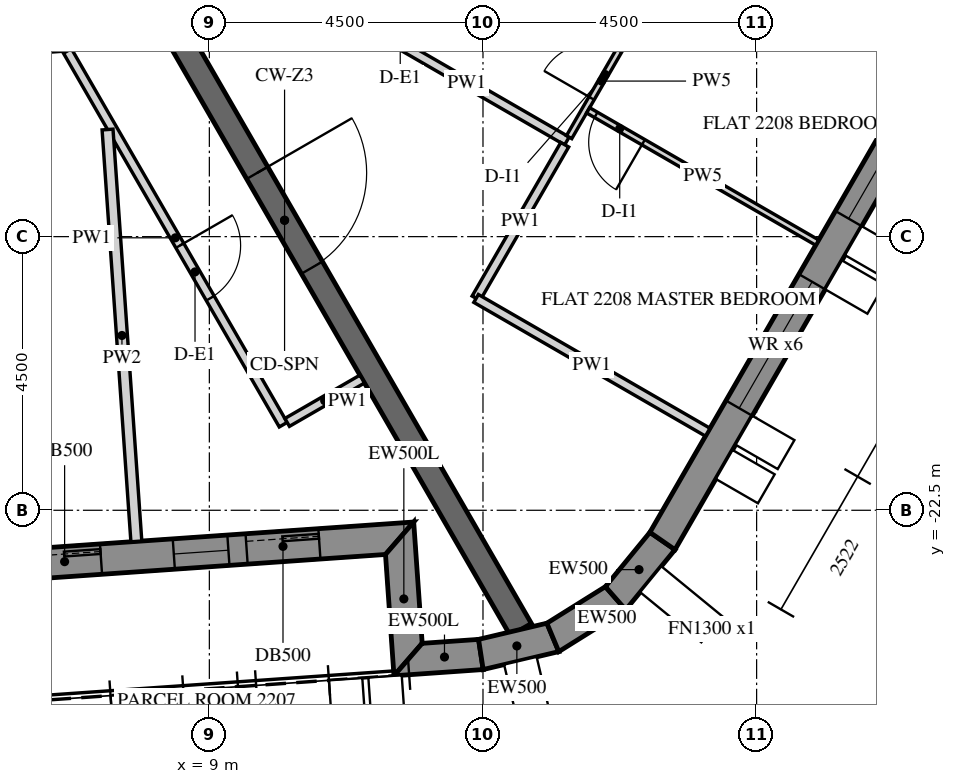
"""IFC4 building model, lengths in metres.
Left out: names, types, materials, properties, quantities, classifications, styles, units other than length and angle.
Written with IfcOpenShell. Run it as: python <this file> out.ifc"""

import sys

from ifc_helpers import new_model, si_unit, direction, frame, frame_2d, origin, place, context, subcontext, project, spatial, polyline, rectangle, outline, extrude, element, fill, save


model = new_model("IFC4")
c1 = context("Model", 3, precision=1e-05, world=origin(), true_north=direction((0.0, 1.0)))
c2 = subcontext(c1, "Body", "Model", "MODEL_VIEW")
j1 = project(units=[si_unit("LENGTHUNIT", "METRE"), si_unit("PLANEANGLEUNIT", "RADIAN")], contexts=[c1])
p1 = place(None, origin())
s1 = spatial("IfcSite", under=j1, at=p1, CompositionType="ELEMENT")
p2 = place(p1, origin())
s2 = spatial("IfcBuilding", under=s1, at=p2, CompositionType="ELEMENT")
p3 = place(p2, frame((0.0, 0.0, 279.6)))
s3 = spatial("IfcBuildingStorey", under=s2, at=p3, CompositionType="ELEMENT", Elevation=279.6)
p4 = place(p3, frame((-10.86, -24.567, -0.15), z_axis=(0.0, 0.0, 1.0), x_axis=(0.997564329317, 0.06975248292, 0.0)))
e1 = element("IfcWall", 1, at=p4, inside=s3, PredefinedType="SOLIDWALL", context=c2, shape_type="SweptSolid", body=[
    extrude(outline(polyline([(0.25, -0.25), (22.795, -0.25), (23.295, 0.25), (-0.25, 0.25), (0.25, -0.25)])), origin(), (0.0, 0.0, 1.0), 3.9),
])
p5 = place(p4, frame((1.323, 0.0, 1.05)))
e2 = element("IfcOpeningElement", 2, at=p5, cuts=e1, PredefinedType="OPENING", context=c2, shape_type="SweptSolid", body=[
    extrude(rectangle(XDim=0.9, YDim=1.5, at=frame_2d((0.45, 0.75))), frame((0.0, 0.26, 0.0), z_axis=(0.0, -1.0, 0.0), x_axis=(1.0, 0.0, 0.0)), (0.0, 0.0, 1.0), 0.52),
])
p6 = place(p4, frame((2.522, 0.0, 0.15)))
e3 = element("IfcOpeningElement", 3, at=p6, cuts=e1, PredefinedType="OPENING", context=c2, shape_type="SweptSolid", body=[
    extrude(rectangle(XDim=1.2, YDim=2.4, at=frame_2d((0.6, 1.2))), frame((0.0, 0.26, 0.0), z_axis=(0.0, -1.0, 0.0), x_axis=(1.0, 0.0, 0.0)), (0.0, 0.0, 1.0), 0.52),
])
p7 = place(p4, frame((4.922, 0.0, 1.05)))
e4 = element("IfcOpeningElement", 4, at=p7, cuts=e1, PredefinedType="OPENING", context=c2, shape_type="SweptSolid", body=[
    extrude(rectangle(XDim=0.9, YDim=1.5, at=frame_2d((0.45, 0.75))), frame((0.0, 0.26, 0.0), z_axis=(0.0, -1.0, 0.0), x_axis=(1.0, 0.0, 0.0)), (0.0, 0.0, 1.0), 0.52),
])
p8 = place(p4, frame((6.122, 0.0, 0.15)))
e5 = element("IfcOpeningElement", 5, at=p8, cuts=e1, PredefinedType="OPENING", context=c2, shape_type="SweptSolid", body=[
    extrude(rectangle(XDim=1.2, YDim=2.4, at=frame_2d((0.6, 1.2))), frame((0.0, 0.26, 0.0), z_axis=(0.0, -1.0, 0.0), x_axis=(1.0, 0.0, 0.0)), (0.0, 0.0, 1.0), 0.52),
])
p9 = place(p4, frame((8.522, 0.0, 1.05)))
e6 = element("IfcOpeningElement", 6, at=p9, cuts=e1, PredefinedType="OPENING", context=c2, shape_type="SweptSolid", body=[
    extrude(rectangle(XDim=0.9, YDim=1.5, at=frame_2d((0.45, 0.75))), frame((0.0, 0.26, 0.0), z_axis=(0.0, -1.0, 0.0), x_axis=(1.0, 0.0, 0.0)), (0.0, 0.0, 1.0), 0.52),
])
p10 = place(p4, frame((9.722, 0.0, 0.15)))
e7 = element("IfcOpeningElement", 7, at=p10, cuts=e1, PredefinedType="OPENING", context=c2, shape_type="SweptSolid", body=[
    extrude(rectangle(XDim=1.2, YDim=2.4, at=frame_2d((0.6, 1.2))), frame((0.0, 0.26, 0.0), z_axis=(0.0, -1.0, 0.0), x_axis=(1.0, 0.0, 0.0)), (0.0, 0.0, 1.0), 0.52),
])
p11 = place(p4, frame((12.122, 0.0, 1.05)))
e8 = element("IfcOpeningElement", 8, at=p11, cuts=e1, PredefinedType="OPENING", context=c2, shape_type="SweptSolid", body=[
    extrude(rectangle(XDim=0.9, YDim=1.5, at=frame_2d((0.45, 0.75))), frame((0.0, 0.26, 0.0), z_axis=(0.0, -1.0, 0.0), x_axis=(1.0, 0.0, 0.0)), (0.0, 0.0, 1.0), 0.52),
])
p12 = place(p4, frame((13.323, 0.0, 0.15)))
e9 = element("IfcOpeningElement", 9, at=p12, cuts=e1, PredefinedType="OPENING", context=c2, shape_type="SweptSolid", body=[
    extrude(rectangle(XDim=1.2, YDim=2.4, at=frame_2d((0.6, 1.2))), frame((0.0, 0.26, 0.0), z_axis=(0.0, -1.0, 0.0), x_axis=(1.0, 0.0, 0.0)), (0.0, 0.0, 1.0), 0.52),
])
p13 = place(p4, frame((15.722, 0.0, 1.05)))
e10 = element("IfcOpeningElement", 10, at=p13, cuts=e1, PredefinedType="OPENING", context=c2, shape_type="SweptSolid", body=[
    extrude(rectangle(XDim=0.9, YDim=1.5, at=frame_2d((0.45, 0.75))), frame((0.0, 0.26, 0.0), z_axis=(0.0, -1.0, 0.0), x_axis=(1.0, 0.0, 0.0)), (0.0, 0.0, 1.0), 0.52),
])
p14 = place(p4, frame((16.922, 0.0, 0.15)))
e11 = element("IfcOpeningElement", 11, at=p14, cuts=e1, PredefinedType="OPENING", context=c2, shape_type="SweptSolid", body=[
    extrude(rectangle(XDim=1.2, YDim=2.4, at=frame_2d((0.6, 1.2))), frame((0.0, 0.26, 0.0), z_axis=(0.0, -1.0, 0.0), x_axis=(1.0, 0.0, 0.0)), (0.0, 0.0, 1.0), 0.52),
])
p15 = place(p4, frame((19.323, 0.0, 1.05)))
e12 = element("IfcOpeningElement", 12, at=p15, cuts=e1, PredefinedType="OPENING", context=c2, shape_type="SweptSolid", body=[
    extrude(rectangle(XDim=0.9, YDim=1.5, at=frame_2d((0.45, 0.75))), frame((0.0, 0.26, 0.0), z_axis=(0.0, -1.0, 0.0), x_axis=(1.0, 0.0, 0.0)), (0.0, 0.0, 1.0), 0.52),
])
p16 = place(p4, frame((20.522, 0.0, 0.15)))
e13 = element("IfcOpeningElement", 13, at=p16, cuts=e1, PredefinedType="OPENING", context=c2, shape_type="SweptSolid", body=[
    extrude(rectangle(XDim=1.2, YDim=2.4, at=frame_2d((0.6, 1.2))), frame((0.0, 0.26, 0.0), z_axis=(0.0, -1.0, 0.0), x_axis=(1.0, 0.0, 0.0)), (0.0, 0.0, 1.0), 0.52),
])
p17 = place(p3, frame((12.129, -22.96, -0.15), z_axis=(0.0, 0.0, 1.0), x_axis=(0.069824268692, -0.99755930726, 0.0)))
e14 = element("IfcWall", 14, at=p17, inside=s3, PredefinedType="SOLIDWALL", context=c2, shape_type="SweptSolid", body=[
    extrude(outline(polyline([(0.25, -0.25), (2.25, -0.25), (1.75, 0.25), (-0.25, 0.25), (0.25, -0.25)])), origin(), (0.0, 0.0, 1.0), 3.9),
])
p18 = place(p3, frame((12.268, -24.955, -0.15), z_axis=(0.0, 0.0, 1.0), x_axis=(0.997561942506, 0.06978660948, 0.0)))
e15 = element("IfcWall", 15, at=p18, inside=s3, PredefinedType="SOLIDWALL", context=c2, shape_type="SweptSolid", body=[
    extrude(outline(polyline([(-0.25, -0.25), (1.22, -0.25), (1.179, 0.25), (0.25, 0.25), (-0.25, -0.25)])), origin(), (0.0, 0.0, 1.0), 3.9),
])
p19 = place(p3, frame((13.465, -24.871, -0.15), z_axis=(0.0, 0.0, 1.0), x_axis=(0.973044740285, 0.230616420501, 0.0)))
e16 = element("IfcWall", 16, at=p19, inside=s3, PredefinedType="SOLIDWALL", context=c2, shape_type="SweptSolid", body=[
    extrude(outline(polyline([(-0.021, -0.25), (1.257, -0.25), (1.175, 0.25), (0.021, 0.25), (-0.021, -0.25)])), origin(), (0.0, 0.0, 1.0), 3.9),
])
p20 = place(p3, frame((14.649, -24.591, -0.15), z_axis=(0.0, 0.0, 1.0), x_axis=(0.848054682072, 0.529908724419, 0.0)))
e17 = element("IfcWall", 17, at=p20, inside=s3, PredefinedType="SOLIDWALL", context=c2, shape_type="SweptSolid", body=[
    extrude(outline(polyline([(-0.041, -0.25), (1.257, -0.25), (1.175, 0.25), (0.041, 0.25), (-0.041, -0.25)])), origin(), (0.0, 0.0, 1.0), 3.9),
])
p21 = place(p3, frame((15.68, -23.946, -0.15), z_axis=(0.0, 0.0, 1.0), x_axis=(0.633805934167, 0.773492105852, 0.0)))
e18 = element("IfcWall", 18, at=p21, inside=s3, PredefinedType="SOLIDWALL", context=c2, shape_type="SweptSolid", body=[
    extrude(outline(polyline([(-0.041, -0.25), (1.237, -0.25), (1.196, 0.25), (0.041, 0.25), (-0.041, -0.25)])), origin(), (0.0, 0.0, 1.0), 3.9),
])
p22 = place(p3, frame((16.451, -23.005, -0.15), z_axis=(0.0, 0.0, 1.0), x_axis=(0.500003737743, 0.866023245787, 0.0)))
e19 = element("IfcWall", 19, at=p22, inside=s3, PredefinedType="SOLIDWALL", context=c2, shape_type="SweptSolid", body=[
    extrude(outline(polyline([(-0.021, -0.25), (25.468, -0.25), (25.421, 0.25), (0.021, 0.25), (-0.021, -0.25)])), origin(), (0.0, 0.0, 1.0), 3.9),
])
p23 = place(p22, frame((2.522, 0.0, 0.75)))
e20 = element("IfcOpeningElement", 20, at=p23, cuts=e19, PredefinedType="OPENING", context=c2, shape_type="SweptSolid", body=[
    extrude(rectangle(XDim=2.4, YDim=2.7, at=frame_2d((1.2, 1.35))), frame((0.0, 0.26, 0.0), z_axis=(0.0, -1.0, 0.0), x_axis=(1.0, 0.0, 0.0)), (0.0, 0.0, 1.0), 0.52),
])
p24 = place(p22, frame((6.122, 0.0, 0.75)))
e21 = element("IfcOpeningElement", 21, at=p24, cuts=e19, PredefinedType="OPENING", context=c2, shape_type="SweptSolid", body=[
    extrude(rectangle(XDim=2.4, YDim=2.7, at=frame_2d((1.2, 1.35))), frame((0.0, 0.26, 0.0), z_axis=(0.0, -1.0, 0.0), x_axis=(1.0, 0.0, 0.0)), (0.0, 0.0, 1.0), 0.52),
])
p25 = place(p22, frame((9.722, 0.0, 0.75)))
e22 = element("IfcOpeningElement", 22, at=p25, cuts=e19, PredefinedType="OPENING", context=c2, shape_type="SweptSolid", body=[
    extrude(rectangle(XDim=2.4, YDim=2.7, at=frame_2d((1.2, 1.35))), frame((0.0, 0.26, 0.0), z_axis=(0.0, -1.0, 0.0), x_axis=(1.0, 0.0, 0.0)), (0.0, 0.0, 1.0), 0.52),
])
p26 = place(p22, frame((13.323, 0.0, 0.75)))
e23 = element("IfcOpeningElement", 23, at=p26, cuts=e19, PredefinedType="OPENING", context=c2, shape_type="SweptSolid", body=[
    extrude(rectangle(XDim=2.4, YDim=2.7, at=frame_2d((1.2, 1.35))), frame((0.0, 0.26, 0.0), z_axis=(0.0, -1.0, 0.0), x_axis=(1.0, 0.0, 0.0)), (0.0, 0.0, 1.0), 0.52),
])
p27 = place(p22, frame((16.922, 0.0, 0.75)))
e24 = element("IfcOpeningElement", 24, at=p27, cuts=e19, PredefinedType="OPENING", context=c2, shape_type="SweptSolid", body=[
    extrude(rectangle(XDim=2.4, YDim=2.7, at=frame_2d((1.2, 1.35))), frame((0.0, 0.26, 0.0), z_axis=(0.0, -1.0, 0.0), x_axis=(1.0, 0.0, 0.0)), (0.0, 0.0, 1.0), 0.52),
])
p28 = place(p22, frame((20.522, 0.0, 0.75)))
e25 = element("IfcOpeningElement", 25, at=p28, cuts=e19, PredefinedType="OPENING", context=c2, shape_type="SweptSolid", body=[
    extrude(rectangle(XDim=2.4, YDim=2.7, at=frame_2d((1.2, 1.35))), frame((0.0, 0.26, 0.0), z_axis=(0.0, -1.0, 0.0), x_axis=(1.0, 0.0, 0.0)), (0.0, 0.0, 1.0), 0.52),
])
p29 = place(p3, frame((6.351, -11.0, -0.15), z_axis=(0.0, 0.0, 1.0), x_axis=(0.499998894578, -0.866026041999, 0.0)))
e26 = element("IfcWall", 26, at=p29, inside=s3, PredefinedType="SHEAR", context=c2, shape_type="SweptSolid", body=[
    extrude(rectangle(XDim=15.544, YDim=0.4, at=frame_2d((7.772, 0.0))), origin(), (0.0, 0.0, 1.0), 3.9),
])
p30 = place(p29, frame((6.872, 0.0, 0.15)))
e27 = element("IfcOpeningElement", 27, at=p30, cuts=e26, PredefinedType="OPENING", context=c2, shape_type="SweptSolid", body=[
    extrude(rectangle(XDim=1.8, YDim=2.4, at=frame_2d((0.9, 1.2))), frame((0.0, 0.21, 0.0), z_axis=(0.0, -1.0, 0.0), x_axis=(1.0, 0.0, 0.0)), (0.0, 0.0, 1.0), 0.42),
])
p31 = place(p3, frame((-10.606, -16.079, 0.0), z_axis=(0.0, 0.0, 1.0), x_axis=(0.997563356349, 0.069766396426, 0.0)))
e28 = element("IfcWall", 28, at=p31, inside=s3, PredefinedType="PARTITIONING", context=c2, shape_type="SweptSolid", body=[
    extrude(rectangle(XDim=17.273, YDim=0.15, at=frame_2d((8.636, 0.0))), origin(), (0.0, 0.0, 1.0), 2.988),
])
p32 = place(p31, frame((3.877, 0.0, 0.0)))
e29 = element("IfcOpeningElement", 29, at=p32, cuts=e28, PredefinedType="OPENING", context=c2, shape_type="SweptSolid", body=[
    extrude(rectangle(XDim=1.0, YDim=2.1, at=frame_2d((0.5, 1.05))), frame((0.0, 0.085, 0.0), z_axis=(0.0, -1.0, 0.0), x_axis=(1.0, 0.0, 0.0)), (0.0, 0.0, 1.0), 0.17),
])
p33 = place(p3, frame((6.666, -14.946, 0.0), z_axis=(0.0, 0.0, 1.0), x_axis=(0.499979539361, -0.866037216418, 0.0)))
e30 = element("IfcWall", 30, at=p33, inside=s3, PredefinedType="PARTITIONING", context=c2, shape_type="SweptSolid", body=[
    extrude(rectangle(XDim=7.097, YDim=0.15, at=frame_2d((3.548, 0.0))), origin(), (0.0, 0.0, 1.0), 2.988),
])
p34 = place(p33, frame((3.696, 0.0, 0.0)))
e31 = element("IfcOpeningElement", 31, at=p34, cuts=e30, PredefinedType="OPENING", context=c2, shape_type="SweptSolid", body=[
    extrude(rectangle(XDim=1.0, YDim=2.1, at=frame_2d((0.5, 1.05))), frame((0.0, 0.085, 0.0), z_axis=(0.0, -1.0, 0.0), x_axis=(1.0, 0.0, 0.0)), (0.0, 0.0, 1.0), 0.17),
])
p35 = place(p3, frame((10.28, -21.055, 0.0), z_axis=(0.0, 0.0, 1.0), x_axis=(0.866020080793, 0.500009219579, 0.0)))
e32 = element("IfcWall", 32, at=p35, inside=s3, PredefinedType="PARTITIONING", context=c2, shape_type="SweptSolid", body=[
    extrude(rectangle(XDim=1.425, YDim=0.15, at=frame_2d((0.712, 0.0))), origin(), (0.0, 0.0, 1.0), 2.988),
])
p36 = place(p3, frame((14.88, -16.427, 0.0), z_axis=(0.0, 0.0, 1.0), x_axis=(-0.86601654697, 0.500015340139, 0.0)))
e33 = element("IfcWall", 33, at=p36, inside=s3, PredefinedType="PARTITIONING", context=c2, shape_type="SweptSolid", body=[
    extrude(rectangle(XDim=3.8, YDim=0.15, at=frame_2d((1.9, 0.0))), origin(), (0.0, 0.0, 1.0), 2.988),
])
p37 = place(p3, frame((13.386, -19.014, 0.0), z_axis=(0.0, 0.0, 1.0), x_axis=(0.499983307531, 0.866035040971, 0.0)))
e34 = element("IfcWall", 34, at=p37, inside=s3, PredefinedType="PARTITIONING", context=c2, shape_type="SweptSolid", body=[
    extrude(rectangle(XDim=2.917, YDim=0.15, at=frame_2d((1.458, 0.0))), origin(), (0.0, 0.0, 1.0), 2.988),
])
p38 = place(p3, frame((17.196, -21.216, 0.0), z_axis=(0.0, 0.0, 1.0), x_axis=(-0.866010893236, 0.500025132165, 0.0)))
e35 = element("IfcWall", 35, at=p38, inside=s3, PredefinedType="PARTITIONING", context=c2, shape_type="SweptSolid", body=[
    extrude(rectangle(XDim=4.399, YDim=0.15, at=frame_2d((2.199, 0.0))), origin(), (0.0, 0.0, 1.0), 2.988),
])
p39 = place(p3, frame((7.8, -23.012, 0.0), z_axis=(0.0, 0.0, 1.0), x_axis=(-0.069757205717, 0.997563999075, 0.0)))
e36 = element("IfcWall", 36, at=p39, inside=s3, PredefinedType="PARTITIONING", context=c2, shape_type="SweptSolid", body=[
    extrude(rectangle(XDim=6.79, YDim=0.18, at=frame_2d((3.395, 0.0))), origin(), (0.0, 0.0, 1.0), 2.988),
])
p40 = place(p3, frame((16.986, -12.78, 0.0), z_axis=(0.0, 0.0, 1.0), x_axis=(0.866032203192, -0.499988222896, 0.0)))
e37 = element("IfcWall", 37, at=p40, inside=s3, PredefinedType="PARTITIONING", context=c2, shape_type="SweptSolid", body=[
    extrude(rectangle(XDim=4.4, YDim=0.1, at=frame_2d((2.2, 0.0))), origin(), (0.0, 0.0, 1.0), 2.988),
])
p41 = place(p40, frame((0.2, 0.0, 0.0)))
e38 = element("IfcOpeningElement", 38, at=p41, cuts=e37, PredefinedType="OPENING", context=c2, shape_type="SweptSolid", body=[
    extrude(rectangle(XDim=0.9, YDim=2.1, at=frame_2d((0.45, 1.05))), frame((0.0, 0.06, 0.0), z_axis=(0.0, -1.0, 0.0), x_axis=(1.0, 0.0, 0.0)), (0.0, 0.0, 1.0), 0.12),
])
p42 = place(p3, frame((14.917, -16.364, 0.0), z_axis=(0.0, 0.0, 1.0), x_axis=(0.499987164874, 0.866032814021, 0.0)))
e39 = element("IfcWall", 39, at=p42, inside=s3, PredefinedType="PARTITIONING", context=c2, shape_type="SweptSolid", body=[
    extrude(rectangle(XDim=2.129, YDim=0.1, at=frame_2d((1.064, 0.0))), origin(), (0.0, 0.0, 1.0), 2.988),
])
p43 = place(p42, frame((0.738, 0.0, 0.0)))
e40 = element("IfcOpeningElement", 40, at=p43, cuts=e39, PredefinedType="OPENING", context=c2, shape_type="SweptSolid", body=[
    extrude(rectangle(XDim=0.9, YDim=2.1, at=frame_2d((0.45, 1.05))), frame((0.0, 0.06, 0.0), z_axis=(0.0, -1.0, 0.0), x_axis=(1.0, 0.0, 0.0)), (0.0, 0.0, 1.0), 0.12),
])
p44 = place(p3, frame((18.996, -18.098, 0.0), z_axis=(0.0, 0.0, 1.0), x_axis=(-0.866027639635, 0.499996127374, 0.0)))
e41 = element("IfcWall", 41, at=p44, inside=s3, PredefinedType="PARTITIONING", context=c2, shape_type="SweptSolid", body=[
    extrude(rectangle(XDim=4.35, YDim=0.1, at=frame_2d((2.175, 0.0))), origin(), (0.0, 0.0, 1.0), 2.988),
])
p45 = place(p44, frame((3.3, 0.0, 0.0)))
e42 = element("IfcOpeningElement", 42, at=p45, cuts=e41, PredefinedType="OPENING", context=c2, shape_type="SweptSolid", body=[
    extrude(rectangle(XDim=0.9, YDim=2.1, at=frame_2d((0.45, 1.05))), frame((0.0, 0.06, 0.0), z_axis=(0.0, -1.0, 0.0), x_axis=(1.0, 0.0, 0.0)), (0.0, 0.0, 1.0), 0.12),
])
p46 = place(p14, frame((0.0, 0.175, 0.0)))
e43 = element("IfcDoor", 43, at=p46, inside=s3, OperationType="SLIDING_TO_LEFT", PredefinedType="DOOR", context=c2, shape_type="SweptSolid", body=[
    extrude(rectangle(XDim=1.2, YDim=2.4, at=frame_2d((0.6, 1.2))), frame((0.0, 0.025, 0.0), z_axis=(0.0, -1.0, 0.0), x_axis=(1.0, 0.0, 0.0)), (0.0, 0.0, 1.0), 0.05),
])
fill(e11, e43)
p47 = place(p15, frame((0.0, 0.18, 0.0)))
e44 = element("IfcWindow", 44, at=p47, inside=s3, PartitioningType="SINGLE_PANEL", PredefinedType="WINDOW", context=c2, shape_type="SweptSolid", body=[
    extrude(rectangle(XDim=0.9, YDim=1.5, at=frame_2d((0.45, 0.75))), frame((0.0, 0.03, 0.0), z_axis=(0.0, -1.0, 0.0), x_axis=(1.0, 0.0, 0.0)), (0.0, 0.0, 1.0), 0.06),
])
fill(e12, e44)
p48 = place(p16, frame((0.0, 0.175, 0.0)))
e45 = element("IfcDoor", 45, at=p48, inside=s3, OperationType="SLIDING_TO_LEFT", PredefinedType="DOOR", context=c2, shape_type="SweptSolid", body=[
    extrude(rectangle(XDim=1.2, YDim=2.4, at=frame_2d((0.6, 1.2))), frame((0.0, 0.025, 0.0), z_axis=(0.0, -1.0, 0.0), x_axis=(1.0, 0.0, 0.0)), (0.0, 0.0, 1.0), 0.05),
])
fill(e13, e45)
p49 = place(p23, frame((0.0, 0.18, 0.0)))
e46 = element("IfcWindow", 46, at=p49, inside=s3, PartitioningType="DOUBLE_PANEL_VERTICAL", PredefinedType="WINDOW", context=c2, shape_type="SweptSolid", body=[
    extrude(rectangle(XDim=2.4, YDim=2.7, at=frame_2d((1.2, 1.35))), frame((0.0, 0.03, 0.0), z_axis=(0.0, -1.0, 0.0), x_axis=(1.0, 0.0, 0.0)), (0.0, 0.0, 1.0), 0.06),
])
fill(e20, e46)
p50 = place(p24, frame((0.0, 0.18, 0.0)))
e47 = element("IfcWindow", 47, at=p50, inside=s3, PartitioningType="DOUBLE_PANEL_VERTICAL", PredefinedType="WINDOW", context=c2, shape_type="SweptSolid", body=[
    extrude(rectangle(XDim=2.4, YDim=2.7, at=frame_2d((1.2, 1.35))), frame((0.0, 0.03, 0.0), z_axis=(0.0, -1.0, 0.0), x_axis=(1.0, 0.0, 0.0)), (0.0, 0.0, 1.0), 0.06),
])
fill(e21, e47)
p51 = place(p30, origin())
e48 = element("IfcDoor", 48, at=p51, inside=s3, OperationType="DOUBLE_DOOR_SINGLE_SWING", PredefinedType="DOOR", context=c2, shape_type="SweptSolid", body=[
    extrude(rectangle(XDim=1.8, YDim=2.4, at=frame_2d((0.9, 1.2))), frame((0.0, 0.025, 0.0), z_axis=(0.0, -1.0, 0.0), x_axis=(1.0, 0.0, 0.0)), (0.0, 0.0, 1.0), 0.05),
])
fill(e27, e48)
p52 = place(p34, origin())
e49 = element("IfcDoor", 49, at=p52, inside=s3, OperationType="SINGLE_SWING_RIGHT", PredefinedType="DOOR", context=c2, shape_type="SweptSolid", body=[
    extrude(rectangle(XDim=1.0, YDim=2.1, at=frame_2d((0.5, 1.05))), frame((0.0, 0.025, 0.0), z_axis=(0.0, -1.0, 0.0), x_axis=(1.0, 0.0, 0.0)), (0.0, 0.0, 1.0), 0.05),
])
fill(e31, e49)
p53 = place(p43, origin())
e50 = element("IfcDoor", 50, at=p53, inside=s3, OperationType="SINGLE_SWING_RIGHT", PredefinedType="DOOR", context=c2, shape_type="SweptSolid", body=[
    extrude(rectangle(XDim=0.9, YDim=2.1, at=frame_2d((0.45, 1.05))), frame((0.0, 0.025, 0.0), z_axis=(0.0, -1.0, 0.0), x_axis=(1.0, 0.0, 0.0)), (0.0, 0.0, 1.0), 0.05),
])
fill(e40, e50)
p54 = place(p45, origin())
e51 = element("IfcDoor", 51, at=p54, inside=s3, OperationType="SINGLE_SWING_RIGHT", PredefinedType="DOOR", context=c2, shape_type="SweptSolid", body=[
    extrude(rectangle(XDim=0.9, YDim=2.1, at=frame_2d((0.45, 1.05))), frame((0.0, 0.025, 0.0), z_axis=(0.0, -1.0, 0.0), x_axis=(1.0, 0.0, 0.0)), (0.0, 0.0, 1.0), 0.05),
])
fill(e42, e51)
save(model, sys.argv[1])
